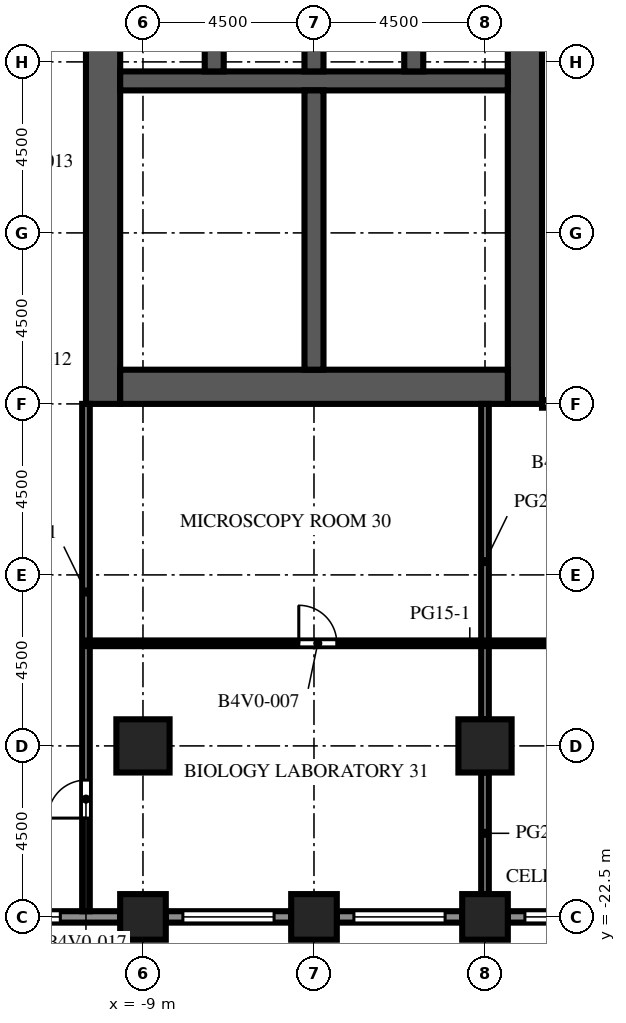
"""IFC4 building model, lengths in metres.
Left out: names, types, materials, properties, quantities, classifications, styles, units other than length and angle.
Written with IfcOpenShell. Run it as: python <this file> out.ifc"""

import sys

from ifc_helpers import new_model, si_unit, direction, frame, frame_2d, origin, origin_2d, place, context, subcontext, project, spatial, rectangle, extrude, element, fill, save


model = new_model("IFC4")
c1 = context("Model", 3, precision=1e-05, world=origin(), true_north=direction((0.0, 1.0)))
c2 = subcontext(c1, "Body", "Model", "MODEL_VIEW")
j1 = project(units=[si_unit("LENGTHUNIT", "METRE"), si_unit("PLANEANGLEUNIT", "RADIAN")], contexts=[c1])
p1 = place(None, origin())
s1 = spatial("IfcSite", under=j1, at=p1, CompositionType="ELEMENT")
p2 = place(p1, origin())
s2 = spatial("IfcBuilding", under=s1, at=p2, CompositionType="ELEMENT")
p3 = place(p2, frame((0.0, 0.0, 120.8)))
s3 = spatial("IfcBuildingStorey", under=s2, at=p3, CompositionType="ELEMENT", Elevation=120.8)
for number, where, z_axis, x_axis in (
    (1, (-9.0, -22.5, 0.0), (0.0, 0.0, 1.0), (1.0, 0.0, 0.0)),
    (2, (-4.5, -22.5, 0.0), (0.0, 0.0, 1.0), (1.0, 0.0, 0.0)),
    (3, (0.0, -22.5, 0.0), (0.0, 0.0, 1.0), (1.0, 0.0, 0.0)),
):
    element("IfcColumn", number, at=place(p3, frame(where, z_axis=z_axis, x_axis=x_axis)), inside=s3, PredefinedType="COLUMN", context=c2, shape_type="SweptSolid", body=[
        extrude(rectangle(XDim=1.2, YDim=1.2, at=origin_2d()), origin(), (0.0, 0.0, 1.0), 4.1),
    ])
for number, where, z_axis, x_axis in (
    (4, (-9.0, -18.0, 0.0), (0.0, 0.0, 1.0), (1.0, 0.0, 0.0)),
    (5, (0.0, -18.0, 0.0), (0.0, 0.0, 1.0), (1.0, 0.0, 0.0)),
):
    element("IfcColumn", number, at=place(p3, frame(where, z_axis=z_axis, x_axis=x_axis)), inside=s3, PredefinedType="COLUMN", context=c2, shape_type="SweptSolid", body=[
        extrude(rectangle(XDim=1.4, YDim=1.4, at=origin_2d()), origin(), (0.0, 0.0, 1.0), 4.1),
    ])
p4 = place(p3, frame((-10.05, -9.0, 0.0), z_axis=(0.0, 0.0, 1.0), x_axis=(0.0, 1.0, 0.0)))
e6 = element("IfcWall", 6, at=p4, inside=s3, PredefinedType="SHEAR", context=c2, shape_type="SweptSolid", body=[
    extrude(rectangle(XDim=27.5, YDim=0.9, at=frame_2d((13.75, 0.0))), origin(), (0.0, 0.0, 1.0), 4.1),
])
p5 = place(p4, frame((12.55, 0.0, 0.0)))
e7 = element("IfcOpeningElement", 7, at=p5, cuts=e6, PredefinedType="OPENING", context=c2, shape_type="SweptSolid", body=[
    extrude(rectangle(XDim=2.4, YDim=2.4, at=frame_2d((1.2, 1.2))), frame((0.0, 0.46, 0.0), z_axis=(0.0, -1.0, 0.0), x_axis=(1.0, 0.0, 0.0)), (0.0, 0.0, 1.0), 0.92),
])
p6 = place(p4, frame((6.825, 0.0, 0.0)))
e8 = element("IfcOpeningElement", 8, at=p6, cuts=e6, PredefinedType="OPENING", context=c2, shape_type="SweptSolid", body=[
    extrude(rectangle(XDim=1.2, YDim=2.1, at=frame_2d((0.6, 1.05))), frame((0.0, 0.46, 0.0), z_axis=(0.0, -1.0, 0.0), x_axis=(1.0, 0.0, 0.0)), (0.0, 0.0, 1.0), 0.92),
])
p7 = place(p4, frame((19.475, 0.0, 0.0)))
e9 = element("IfcOpeningElement", 9, at=p7, cuts=e6, PredefinedType="OPENING", context=c2, shape_type="SweptSolid", body=[
    extrude(rectangle(XDim=1.2, YDim=2.1, at=frame_2d((0.6, 1.05))), frame((0.0, 0.46, 0.0), z_axis=(0.0, -1.0, 0.0), x_axis=(1.0, 0.0, 0.0)), (0.0, 0.0, 1.0), 0.92),
])
p8 = place(p3, frame((1.05, -9.0, 0.0), z_axis=(0.0, 0.0, 1.0), x_axis=(0.0, 1.0, 0.0)))
e10 = element("IfcWall", 10, at=p8, inside=s3, PredefinedType="SHEAR", context=c2, shape_type="SweptSolid", body=[
    extrude(rectangle(XDim=27.5, YDim=0.9, at=frame_2d((13.75, 0.0))), origin(), (0.0, 0.0, 1.0), 4.1),
])
p9 = place(p8, frame((12.55, 0.0, 0.0)))
e11 = element("IfcOpeningElement", 11, at=p9, cuts=e10, PredefinedType="OPENING", context=c2, shape_type="SweptSolid", body=[
    extrude(rectangle(XDim=2.4, YDim=2.4, at=frame_2d((1.2, 1.2))), frame((0.0, 0.46, 0.0), z_axis=(0.0, -1.0, 0.0), x_axis=(1.0, 0.0, 0.0)), (0.0, 0.0, 1.0), 0.92),
])
p10 = place(p8, frame((3.975, 0.0, 0.0)))
e12 = element("IfcOpeningElement", 12, at=p10, cuts=e10, PredefinedType="OPENING", context=c2, shape_type="SweptSolid", body=[
    extrude(rectangle(XDim=1.2, YDim=2.1, at=frame_2d((0.6, 1.05))), frame((0.0, 0.46, 0.0), z_axis=(0.0, -1.0, 0.0), x_axis=(1.0, 0.0, 0.0)), (0.0, 0.0, 1.0), 0.92),
])
p11 = place(p8, frame((19.485, 0.0, 0.0)))
e13 = element("IfcOpeningElement", 13, at=p11, cuts=e10, PredefinedType="OPENING", context=c2, shape_type="SweptSolid", body=[
    extrude(rectangle(XDim=1.0, YDim=2.1, at=frame_2d((0.5, 1.05))), frame((0.0, 0.46, 0.0), z_axis=(0.0, -1.0, 0.0), x_axis=(1.0, 0.0, 0.0)), (0.0, 0.0, 1.0), 0.92),
])
p12 = place(p8, frame((21.139, 0.0, 0.0)))
e14 = element("IfcOpeningElement", 14, at=p12, cuts=e10, PredefinedType="OPENING", context=c2, shape_type="SweptSolid", body=[
    extrude(rectangle(XDim=1.0, YDim=2.1, at=frame_2d((0.5, 1.05))), frame((0.0, 0.46, 0.0), z_axis=(0.0, -1.0, 0.0), x_axis=(1.0, 0.0, 0.0)), (0.0, 0.0, 1.0), 0.92),
])
p13 = place(p8, frame((23.16, 0.0, 0.0)))
e15 = element("IfcOpeningElement", 15, at=p13, cuts=e10, PredefinedType="OPENING", context=c2, shape_type="SweptSolid", body=[
    extrude(rectangle(XDim=1.0, YDim=2.1, at=frame_2d((0.5, 1.05))), frame((0.0, 0.46, 0.0), z_axis=(0.0, -1.0, 0.0), x_axis=(1.0, 0.0, 0.0)), (0.0, 0.0, 1.0), 0.92),
])
p14 = place(p8, frame((25.181, 0.0, 0.0)))
e16 = element("IfcOpeningElement", 16, at=p14, cuts=e10, PredefinedType="OPENING", context=c2, shape_type="SweptSolid", body=[
    extrude(rectangle(XDim=1.0, YDim=2.1, at=frame_2d((0.5, 1.05))), frame((0.0, 0.46, 0.0), z_axis=(0.0, -1.0, 0.0), x_axis=(1.0, 0.0, 0.0)), (0.0, 0.0, 1.0), 0.92),
])
p15 = place(p3, frame((-9.6, -8.55, 0.0), z_axis=(0.0, 0.0, 1.0), x_axis=(1.0, 0.0, 0.0)))
e17 = element("IfcWall", 17, at=p15, inside=s3, PredefinedType="SHEAR", context=c2, shape_type="SweptSolid", body=[
    extrude(rectangle(XDim=10.2, YDim=0.9, at=frame_2d((5.1, 0.0))), origin(), (0.0, 0.0, 1.0), 4.1),
])
p16 = place(p3, frame((-9.6, -0.5, 0.0), z_axis=(0.0, 0.0, 1.0), x_axis=(1.0, 0.0, 0.0)))
e18 = element("IfcWall", 18, at=p16, inside=s3, PredefinedType="SHEAR", context=c2, shape_type="SweptSolid", body=[
    extrude(rectangle(XDim=10.2, YDim=0.5, at=frame_2d((5.1, 0.0))), origin(), (0.0, 0.0, 1.0), 4.1),
])
for number, where, z_axis, x_axis in (
    (19, (-7.125, -0.25, 0.0), (0.0, 0.0, 1.0), (0.0, 1.0, 0.0)),
    (20, (-4.5, -0.25, 0.0), (0.0, 0.0, 1.0), (0.0, 1.0, 0.0)),
    (21, (-1.875, -0.25, 0.0), (0.0, 0.0, 1.0), (0.0, 1.0, 0.0)),
):
    element("IfcWall", number, at=place(p3, frame(where, z_axis=z_axis, x_axis=x_axis)), inside=s3, PredefinedType="SHEAR", context=c2, shape_type="SweptSolid", body=[
        extrude(rectangle(XDim=2.8, YDim=0.5, at=frame_2d((1.4, 0.0))), origin(), (0.0, 0.0, 1.0), 4.1),
    ])
p17 = place(p3, frame((-4.5, -8.1, 0.0), z_axis=(0.0, 0.0, 1.0), x_axis=(0.0, 1.0, 0.0)))
e22 = element("IfcWall", 22, at=p17, inside=s3, PredefinedType="SHEAR", context=c2, shape_type="SweptSolid", body=[
    extrude(rectangle(XDim=7.35, YDim=0.5, at=frame_2d((3.675, 0.0))), origin(), (0.0, 0.0, 1.0), 4.1),
])
p18 = place(p3, frame((-9.6, -22.5, 0.0), z_axis=(0.0, 0.0, 1.0), x_axis=(-1.0, 0.0, 0.0)))
e23 = element("IfcWall", 23, at=p18, inside=s3, PredefinedType="SOLIDWALL", context=c2, shape_type="SweptSolid", body=[
    extrude(rectangle(XDim=3.3, YDim=0.3, at=frame_2d((1.65, 0.0))), origin(), (0.0, 0.0, 1.0), 2.75),
])
p19 = place(p18, frame((1.575, 0.0, 0.8)))
e24 = element("IfcOpeningElement", 24, at=p19, cuts=e23, PredefinedType="OPENING", context=c2, shape_type="SweptSolid", body=[
    extrude(rectangle(XDim=1.2, YDim=1.7, at=frame_2d((0.6, 0.85))), frame((0.0, 0.16, 0.0), z_axis=(0.0, -1.0, 0.0), x_axis=(1.0, 0.0, 0.0)), (0.0, 0.0, 1.0), 0.32),
])
p20 = place(p3, frame((-5.1, -22.5, 0.0), z_axis=(0.0, 0.0, 1.0), x_axis=(-1.0, 0.0, 0.0)))
e25 = element("IfcWall", 25, at=p20, inside=s3, PredefinedType="SOLIDWALL", context=c2, shape_type="SweptSolid", body=[
    extrude(rectangle(XDim=3.3, YDim=0.3, at=frame_2d((1.65, 0.0))), origin(), (0.0, 0.0, 1.0), 2.75),
])
p21 = place(p20, frame((0.45, 0.0, 0.8)))
e26 = element("IfcOpeningElement", 26, at=p21, cuts=e25, PredefinedType="OPENING", context=c2, shape_type="SweptSolid", body=[
    extrude(rectangle(XDim=2.4, YDim=1.7, at=frame_2d((1.2, 0.85))), frame((0.0, 0.16, 0.0), z_axis=(0.0, -1.0, 0.0), x_axis=(1.0, 0.0, 0.0)), (0.0, 0.0, 1.0), 0.32),
])
p22 = place(p3, frame((-0.6, -22.5, 0.0), z_axis=(0.0, 0.0, 1.0), x_axis=(-1.0, 0.0, 0.0)))
e27 = element("IfcWall", 27, at=p22, inside=s3, PredefinedType="SOLIDWALL", context=c2, shape_type="SweptSolid", body=[
    extrude(rectangle(XDim=3.3, YDim=0.3, at=frame_2d((1.65, 0.0))), origin(), (0.0, 0.0, 1.0), 2.75),
])
p23 = place(p22, frame((0.45, 0.0, 0.8)))
e28 = element("IfcOpeningElement", 28, at=p23, cuts=e27, PredefinedType="OPENING", context=c2, shape_type="SweptSolid", body=[
    extrude(rectangle(XDim=2.4, YDim=1.7, at=frame_2d((1.2, 0.85))), frame((0.0, 0.16, 0.0), z_axis=(0.0, -1.0, 0.0), x_axis=(1.0, 0.0, 0.0)), (0.0, 0.0, 1.0), 0.32),
])
p24 = place(p3, frame((3.9, -22.5, 0.0), z_axis=(0.0, 0.0, 1.0), x_axis=(-1.0, 0.0, 0.0)))
e29 = element("IfcWall", 29, at=p24, inside=s3, PredefinedType="SOLIDWALL", context=c2, shape_type="SweptSolid", body=[
    extrude(rectangle(XDim=3.3, YDim=0.3, at=frame_2d((1.65, 0.0))), origin(), (0.0, 0.0, 1.0), 2.75),
])
p25 = place(p24, frame((0.45, 0.0, 0.8)))
e30 = element("IfcOpeningElement", 30, at=p25, cuts=e29, PredefinedType="OPENING", context=c2, shape_type="SweptSolid", body=[
    extrude(rectangle(XDim=2.4, YDim=1.7, at=frame_2d((1.2, 0.85))), frame((0.0, 0.16, 0.0), z_axis=(0.0, -1.0, 0.0), x_axis=(1.0, 0.0, 0.0)), (0.0, 0.0, 1.0), 0.32),
])
p26 = place(p3, frame((-1.0, -5.895, 0.0), z_axis=(0.0, 0.0, 1.0), x_axis=(1.0, 0.0, 0.0)))
e31 = element("IfcWall", 31, at=p26, inside=s3, PredefinedType="PARTITIONING", context=c2, shape_type="SweptSolid", body=[
    extrude(rectangle(XDim=1.6, YDim=0.1, at=frame_2d((0.8, 0.0))), origin(), (0.0, 0.0, 1.0), 3.65),
])
p27 = place(p26, frame((0.3, 0.0, 0.0)))
e32 = element("IfcOpeningElement", 32, at=p27, cuts=e31, PredefinedType="OPENING", context=c2, shape_type="SweptSolid", body=[
    extrude(rectangle(XDim=1.0, YDim=2.1, at=frame_2d((0.5, 1.05))), frame((0.0, 0.06, 0.0), z_axis=(0.0, -1.0, 0.0), x_axis=(1.0, 0.0, 0.0)), (0.0, 0.0, 1.0), 0.12),
])
p28 = place(p3, frame((-1.0, -2.955, 0.0), z_axis=(0.0, 0.0, 1.0), x_axis=(1.0, 0.0, 0.0)))
e33 = element("IfcWall", 33, at=p28, inside=s3, PredefinedType="PARTITIONING", context=c2, shape_type="SweptSolid", body=[
    extrude(rectangle(XDim=1.6, YDim=0.1, at=frame_2d((0.8, 0.0))), origin(), (0.0, 0.0, 1.0), 3.65),
])
p29 = place(p28, frame((0.3, 0.0, 0.0)))
e34 = element("IfcOpeningElement", 34, at=p29, cuts=e33, PredefinedType="OPENING", context=c2, shape_type="SweptSolid", body=[
    extrude(rectangle(XDim=1.0, YDim=2.1, at=frame_2d((0.5, 1.05))), frame((0.0, 0.06, 0.0), z_axis=(0.0, -1.0, 0.0), x_axis=(1.0, 0.0, 0.0)), (0.0, 0.0, 1.0), 0.12),
])
p30 = place(p3, frame((-1.0, -5.895, 0.0), z_axis=(0.0, 0.0, 1.0), x_axis=(0.0, 1.0, 0.0)))
e35 = element("IfcWall", 35, at=p30, inside=s3, PredefinedType="PARTITIONING", context=c2, shape_type="SweptSolid", body=[
    extrude(rectangle(XDim=2.94, YDim=0.1, at=frame_2d((1.47, 0.0))), origin(), (0.0, 0.0, 1.0), 3.65),
])
p31 = place(p30, frame((0.97, 0.0, 0.0)))
e36 = element("IfcOpeningElement", 36, at=p31, cuts=e35, PredefinedType="OPENING", context=c2, shape_type="SweptSolid", body=[
    extrude(rectangle(XDim=1.0, YDim=2.1, at=frame_2d((0.5, 1.05))), frame((0.0, 0.06, 0.0), z_axis=(0.0, -1.0, 0.0), x_axis=(1.0, 0.0, 0.0)), (0.0, 0.0, 1.0), 0.12),
])
for number, where, z_axis, x_axis in (
    (37, (-4.25, -5.895, 0.0), (0.0, 0.0, 1.0), (1.0, 0.0, 0.0)),
    (38, (-4.25, -2.955, 0.0), (0.0, 0.0, 1.0), (1.0, 0.0, 0.0)),
):
    element("IfcWall", number, at=place(p3, frame(where, z_axis=z_axis, x_axis=x_axis)), inside=s3, PredefinedType="PARTITIONING", context=c2, shape_type="SweptSolid", body=[
        extrude(rectangle(XDim=3.25, YDim=0.1, at=frame_2d((1.625, 0.0))), origin(), (0.0, 0.0, 1.0), 3.65),
    ])
p32 = place(p3, frame((-10.5, -9.0, 0.0), z_axis=(0.0, 0.0, 1.0), x_axis=(0.0, -1.0, 0.0)))
e39 = element("IfcWall", 39, at=p32, inside=s3, PredefinedType="PARTITIONING", context=c2, shape_type="SweptSolid", body=[
    extrude(rectangle(XDim=13.35, YDim=0.2, at=frame_2d((6.675, 0.0))), origin(), (0.0, 0.0, 1.0), 3.65),
])
p33 = place(p32, frame((9.9, 0.0, 0.0)))
e40 = element("IfcOpeningElement", 40, at=p33, cuts=e39, PredefinedType="OPENING", context=c2, shape_type="SweptSolid", body=[
    extrude(rectangle(XDim=1.0, YDim=2.1, at=frame_2d((0.5, 1.05))), frame((0.0, 0.11, 0.0), z_axis=(0.0, -1.0, 0.0), x_axis=(1.0, 0.0, 0.0)), (0.0, 0.0, 1.0), 0.22),
])
p34 = place(p3, frame((0.0, -21.9, 0.0), z_axis=(0.0, 0.0, 1.0), x_axis=(0.0, 1.0, 0.0)))
e41 = element("IfcWall", 41, at=p34, inside=s3, PredefinedType="PARTITIONING", context=c2, shape_type="SweptSolid", body=[
    extrude(rectangle(XDim=3.2, YDim=0.2, at=frame_2d((1.6, 0.0))), origin(), (0.0, 0.0, 1.0), 3.65),
])
p35 = place(p3, frame((0.0, -17.3, 0.0), z_axis=(0.0, 0.0, 1.0), x_axis=(0.0, 1.0, 0.0)))
e42 = element("IfcWall", 42, at=p35, inside=s3, PredefinedType="PARTITIONING", context=c2, shape_type="SweptSolid", body=[
    extrude(rectangle(XDim=8.3, YDim=0.2, at=frame_2d((4.15, 0.0))), origin(), (0.0, 0.0, 1.0), 3.65),
])
p36 = place(p3, frame((-10.5, -15.3, 0.0), z_axis=(0.0, 0.0, 1.0), x_axis=(1.0, 0.0, 0.0)))
e43 = element("IfcWall", 43, at=p36, inside=s3, PredefinedType="PARTITIONING", context=c2, shape_type="SweptSolid", body=[
    extrude(rectangle(XDim=28.5, YDim=0.15, at=frame_2d((14.25, 0.0))), origin(), (0.0, 0.0, 1.0), 3.65),
])
p37 = place(p36, frame((5.6, 0.0, 0.0)))
e44 = element("IfcOpeningElement", 44, at=p37, cuts=e43, PredefinedType="OPENING", context=c2, shape_type="SweptSolid", body=[
    extrude(rectangle(XDim=1.0, YDim=2.1, at=frame_2d((0.5, 1.05))), frame((0.0, 0.085, 0.0), z_axis=(0.0, -1.0, 0.0), x_axis=(1.0, 0.0, 0.0)), (0.0, 0.0, 1.0), 0.17),
])
p38 = place(p36, frame((13.6, 0.0, 0.0)))
e45 = element("IfcOpeningElement", 45, at=p38, cuts=e43, PredefinedType="OPENING", context=c2, shape_type="SweptSolid", body=[
    extrude(rectangle(XDim=1.0, YDim=2.1, at=frame_2d((0.5, 1.05))), frame((0.0, 0.085, 0.0), z_axis=(0.0, -1.0, 0.0), x_axis=(1.0, 0.0, 0.0)), (0.0, 0.0, 1.0), 0.17),
])
p39 = place(p36, frame((21.1, 0.0, 0.0)))
e46 = element("IfcOpeningElement", 46, at=p39, cuts=e43, PredefinedType="OPENING", context=c2, shape_type="SweptSolid", body=[
    extrude(rectangle(XDim=1.0, YDim=2.1, at=frame_2d((0.5, 1.05))), frame((0.0, 0.085, 0.0), z_axis=(0.0, -1.0, 0.0), x_axis=(1.0, 0.0, 0.0)), (0.0, 0.0, 1.0), 0.17),
])
p40 = place(p36, frame((25.85, 0.0, 0.0)))
e47 = element("IfcOpeningElement", 47, at=p40, cuts=e43, PredefinedType="OPENING", context=c2, shape_type="SweptSolid", body=[
    extrude(rectangle(XDim=1.0, YDim=2.1, at=frame_2d((0.5, 1.05))), frame((0.0, 0.085, 0.0), z_axis=(0.0, -1.0, 0.0), x_axis=(1.0, 0.0, 0.0)), (0.0, 0.0, 1.0), 0.17),
])
p41 = place(p3, frame((6.0, -9.0, 0.0), z_axis=(0.0, 0.0, 1.0), x_axis=(-1.0, 0.0, 0.0)))
e48 = element("IfcWall", 48, at=p41, inside=s3, PredefinedType="PARTITIONING", context=c2, shape_type="SweptSolid", body=[
    extrude(rectangle(XDim=4.5, YDim=0.2, at=frame_2d((2.25, 0.0))), origin(), (0.0, 0.0, 1.0), 3.65),
])
p42 = place(p41, frame((1.65, 0.0, 0.0)))
e49 = element("IfcOpeningElement", 49, at=p42, cuts=e48, PredefinedType="OPENING", context=c2, shape_type="SweptSolid", body=[
    extrude(rectangle(XDim=1.0, YDim=2.1, at=frame_2d((0.5, 1.05))), frame((0.0, 0.11, 0.0), z_axis=(0.0, -1.0, 0.0), x_axis=(1.0, 0.0, 0.0)), (0.0, 0.0, 1.0), 0.22),
])
p43 = place(p19, origin())
e50 = element("IfcWindow", 50, at=p43, inside=s3, PartitioningType="SINGLE_PANEL", PredefinedType="WINDOW", context=c2, shape_type="SweptSolid", body=[
    extrude(rectangle(XDim=1.2, YDim=1.7, at=frame_2d((0.6, 0.85))), frame((0.0, 0.03, 0.0), z_axis=(0.0, -1.0, 0.0), x_axis=(1.0, 0.0, 0.0)), (0.0, 0.0, 1.0), 0.06),
])
fill(e24, e50)
p44 = place(p21, origin())
e51 = element("IfcWindow", 51, at=p44, inside=s3, PartitioningType="SINGLE_PANEL", PredefinedType="WINDOW", context=c2, shape_type="SweptSolid", body=[
    extrude(rectangle(XDim=2.4, YDim=1.7, at=frame_2d((1.2, 0.85))), frame((0.0, 0.03, 0.0), z_axis=(0.0, -1.0, 0.0), x_axis=(1.0, 0.0, 0.0)), (0.0, 0.0, 1.0), 0.06),
])
fill(e26, e51)
p45 = place(p23, origin())
e52 = element("IfcWindow", 52, at=p45, inside=s3, PartitioningType="SINGLE_PANEL", PredefinedType="WINDOW", context=c2, shape_type="SweptSolid", body=[
    extrude(rectangle(XDim=2.4, YDim=1.7, at=frame_2d((1.2, 0.85))), frame((0.0, 0.03, 0.0), z_axis=(0.0, -1.0, 0.0), x_axis=(1.0, 0.0, 0.0)), (0.0, 0.0, 1.0), 0.06),
])
fill(e28, e52)
p46 = place(p25, origin())
e53 = element("IfcWindow", 53, at=p46, inside=s3, PartitioningType="SINGLE_PANEL", PredefinedType="WINDOW", context=c2, shape_type="SweptSolid", body=[
    extrude(rectangle(XDim=2.4, YDim=1.7, at=frame_2d((1.2, 0.85))), frame((0.0, 0.03, 0.0), z_axis=(0.0, -1.0, 0.0), x_axis=(1.0, 0.0, 0.0)), (0.0, 0.0, 1.0), 0.06),
])
fill(e30, e53)
p47 = place(p6, origin())
e54 = element("IfcDoor", 54, at=p47, inside=s3, OperationType="SINGLE_SWING_LEFT", PredefinedType="DOOR", context=c2, shape_type="SweptSolid", body=[
    extrude(rectangle(XDim=1.2, YDim=2.1, at=frame_2d((0.6, 1.05))), frame((0.0, 0.025, 0.0), z_axis=(0.0, -1.0, 0.0), x_axis=(1.0, 0.0, 0.0)), (0.0, 0.0, 1.0), 0.05),
])
fill(e8, e54)
p48 = place(p10, origin())
e55 = element("IfcDoor", 55, at=p48, inside=s3, OperationType="SINGLE_SWING_LEFT", PredefinedType="DOOR", context=c2, shape_type="SweptSolid", body=[
    extrude(rectangle(XDim=1.2, YDim=2.1, at=frame_2d((0.6, 1.05))), frame((0.0, 0.425, 0.0), z_axis=(0.0, -1.0, 0.0), x_axis=(1.0, 0.0, 0.0)), (0.0, 0.0, 1.0), 0.05),
])
fill(e12, e55)
p49 = place(p27, origin())
e56 = element("IfcDoor", 56, at=p49, inside=s3, OperationType="SINGLE_SWING_RIGHT", PredefinedType="DOOR", context=c2, shape_type="SweptSolid", body=[
    extrude(rectangle(XDim=1.0, YDim=2.1, at=frame_2d((0.5, 1.05))), frame((0.0, 0.025, 0.0), z_axis=(0.0, -1.0, 0.0), x_axis=(1.0, 0.0, 0.0)), (0.0, 0.0, 1.0), 0.05),
])
fill(e32, e56)
p50 = place(p29, origin())
e57 = element("IfcDoor", 57, at=p50, inside=s3, OperationType="SINGLE_SWING_LEFT", PredefinedType="DOOR", context=c2, shape_type="SweptSolid", body=[
    extrude(rectangle(XDim=1.0, YDim=2.1, at=frame_2d((0.5, 1.05))), frame((0.0, 0.025, 0.0), z_axis=(0.0, -1.0, 0.0), x_axis=(1.0, 0.0, 0.0)), (0.0, 0.0, 1.0), 0.05),
])
fill(e34, e57)
p51 = place(p31, origin())
e58 = element("IfcDoor", 58, at=p51, inside=s3, OperationType="SINGLE_SWING_RIGHT", PredefinedType="DOOR", context=c2, shape_type="SweptSolid", body=[
    extrude(rectangle(XDim=1.0, YDim=2.1, at=frame_2d((0.5, 1.05))), frame((0.0, 0.025, 0.0), z_axis=(0.0, -1.0, 0.0), x_axis=(1.0, 0.0, 0.0)), (0.0, 0.0, 1.0), 0.05),
])
fill(e36, e58)
p52 = place(p37, origin())
e59 = element("IfcDoor", 59, at=p52, inside=s3, OperationType="SINGLE_SWING_LEFT", PredefinedType="DOOR", context=c2, shape_type="SweptSolid", body=[
    extrude(rectangle(XDim=1.0, YDim=2.1, at=frame_2d((0.5, 1.05))), frame((0.0, 0.025, 0.0), z_axis=(0.0, -1.0, 0.0), x_axis=(1.0, 0.0, 0.0)), (0.0, 0.0, 1.0), 0.05),
])
fill(e44, e59)
p53 = place(p33, origin())
e60 = element("IfcDoor", 60, at=p53, inside=s3, OperationType="SINGLE_SWING_RIGHT", PredefinedType="DOOR", context=c2, shape_type="SweptSolid", body=[
    extrude(rectangle(XDim=1.0, YDim=2.1, at=frame_2d((0.5, 1.05))), frame((0.0, 0.025, 0.0), z_axis=(0.0, -1.0, 0.0), x_axis=(1.0, 0.0, 0.0)), (0.0, 0.0, 1.0), 0.05),
])
fill(e40, e60)
save(model, sys.argv[1])
